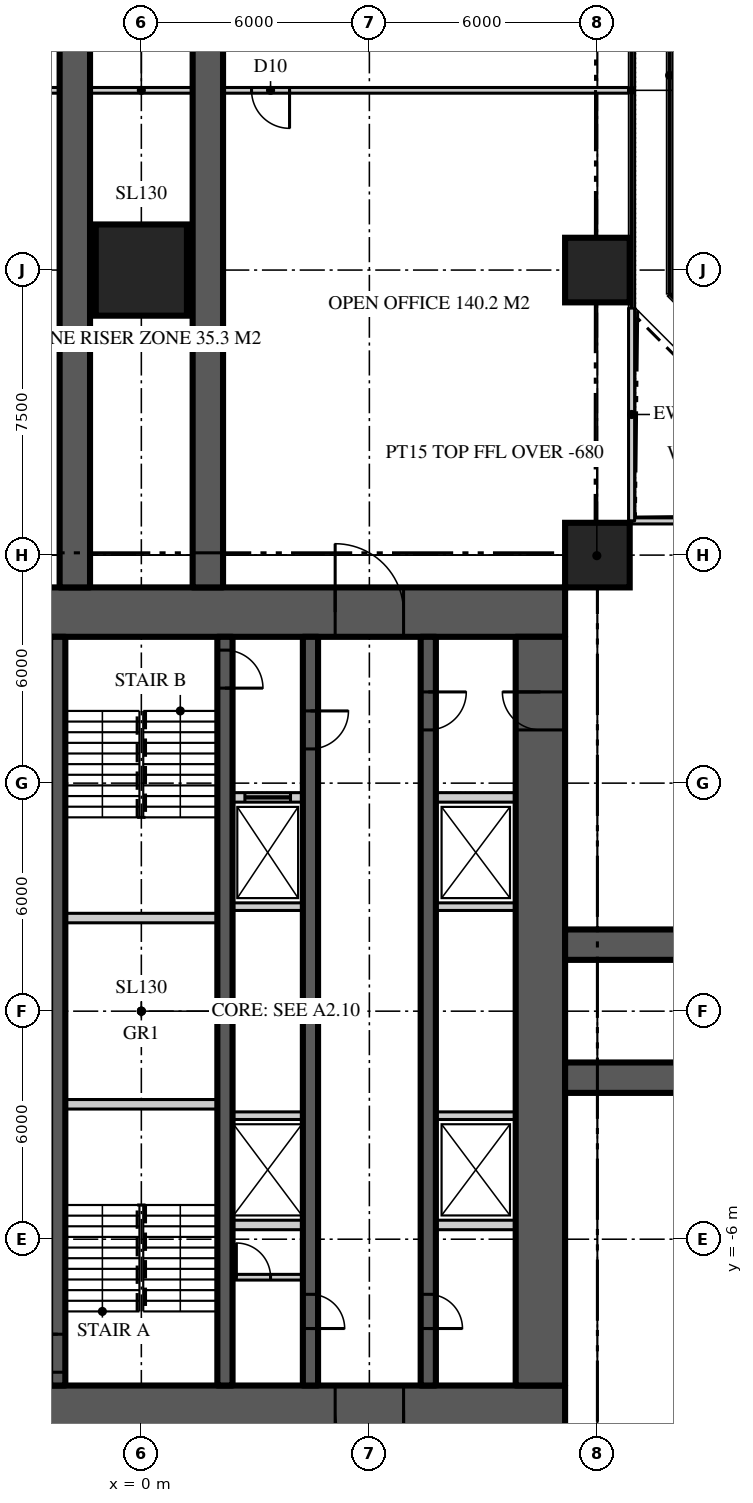
"""IFC4 building model, lengths in metres.
Left out: names, types, materials, properties, quantities, classifications, styles, units other than length and angle.
Written with IfcOpenShell. Run it as: python <this file> out.ifc"""

import sys

from ifc_helpers import new_model, si_unit, direction, frame, frame_2d, origin, origin_2d, place, context, subcontext, project, spatial, rectangle, extrude, element, fill, save


model = new_model("IFC4")
c1 = context("Model", 3, precision=1e-05, world=origin(), true_north=direction((0.0, 1.0)))
c2 = subcontext(c1, "Body", "Model", "MODEL_VIEW")
j1 = project(units=[si_unit("LENGTHUNIT", "METRE"), si_unit("PLANEANGLEUNIT", "RADIAN")], contexts=[c1])
p1 = place(None, origin())
s1 = spatial("IfcSite", under=j1, at=p1, CompositionType="ELEMENT")
p2 = place(p1, origin())
s2 = spatial("IfcBuilding", under=s1, at=p2, CompositionType="ELEMENT")
p3 = place(p2, frame((0.0, 0.0, 51.3)))
s3 = spatial("IfcBuildingStorey", under=s2, at=p3, CompositionType="ELEMENT", Elevation=51.3)
p4 = place(p3, frame((-11.15, 10.5, 0.0), z_axis=(0.0, 0.0, 1.0), x_axis=(1.0, 0.0, 0.0)))
e1 = element("IfcWall", 1, at=p4, inside=s3, PredefinedType="SHEAR", context=c2, shape_type="SweptSolid", body=[
    extrude(rectangle(XDim=22.3, YDim=1.3, at=frame_2d((11.15, 0.0))), origin(), (0.0, 0.0, 1.0), 3.9),
])
p5 = place(p4, frame((4.25, 0.0, 0.0)))
e2 = element("IfcOpeningElement", 2, at=p5, cuts=e1, PredefinedType="OPENING", context=c2, shape_type="SweptSolid", body=[
    extrude(rectangle(XDim=1.8, YDim=2.2, at=frame_2d((0.9, 1.1))), frame((0.0, 0.66, 0.0), z_axis=(0.0, -1.0, 0.0), x_axis=(1.0, 0.0, 0.0)), (0.0, 0.0, 1.0), 1.32),
])
p6 = place(p4, frame((16.25, 0.0, 0.0)))
e3 = element("IfcOpeningElement", 3, at=p6, cuts=e1, PredefinedType="OPENING", context=c2, shape_type="SweptSolid", body=[
    extrude(rectangle(XDim=1.8, YDim=2.2, at=frame_2d((0.9, 1.1))), frame((0.0, 0.66, 0.0), z_axis=(0.0, -1.0, 0.0), x_axis=(1.0, 0.0, 0.0)), (0.0, 0.0, 1.0), 1.32),
])
p7 = place(p3, frame((11.15, -10.5, 0.0), z_axis=(0.0, 0.0, 1.0), x_axis=(-1.0, 0.0, 0.0)))
e4 = element("IfcWall", 4, at=p7, inside=s3, PredefinedType="SHEAR", context=c2, shape_type="SweptSolid", body=[
    extrude(rectangle(XDim=22.3, YDim=1.3, at=frame_2d((11.15, 0.0))), origin(), (0.0, 0.0, 1.0), 3.9),
])
p8 = place(p7, frame((16.25, 0.0, 0.0)))
e5 = element("IfcOpeningElement", 5, at=p8, cuts=e4, PredefinedType="OPENING", context=c2, shape_type="SweptSolid", body=[
    extrude(rectangle(XDim=1.8, YDim=2.2, at=frame_2d((0.9, 1.1))), frame((0.0, 0.66, 0.0), z_axis=(0.0, -1.0, 0.0), x_axis=(1.0, 0.0, 0.0)), (0.0, 0.0, 1.0), 1.32),
])
p9 = place(p7, frame((4.25, 0.0, 0.0)))
e6 = element("IfcOpeningElement", 6, at=p9, cuts=e4, PredefinedType="OPENING", context=c2, shape_type="SweptSolid", body=[
    extrude(rectangle(XDim=1.8, YDim=2.2, at=frame_2d((0.9, 1.1))), frame((0.0, 0.66, 0.0), z_axis=(0.0, -1.0, 0.0), x_axis=(1.0, 0.0, 0.0)), (0.0, 0.0, 1.0), 1.32),
])
p10 = place(p3, frame((10.5, -9.85, 0.0), z_axis=(0.0, 0.0, 1.0), x_axis=(0.0, 1.0, 0.0)))
e7 = element("IfcWall", 7, at=p10, inside=s3, PredefinedType="SHEAR", context=c2, shape_type="SweptSolid", body=[
    extrude(rectangle(XDim=19.7, YDim=1.3, at=frame_2d((9.85, 0.0))), origin(), (0.0, 0.0, 1.0), 3.9),
])
p11 = place(p10, frame((17.25, 0.0, 0.0)))
e8 = element("IfcOpeningElement", 8, at=p11, cuts=e7, PredefinedType="OPENING", context=c2, shape_type="SweptSolid", body=[
    extrude(rectangle(XDim=1.0, YDim=2.2, at=frame_2d((0.5, 1.1))), frame((0.0, 0.66, 0.0), z_axis=(0.0, -1.0, 0.0), x_axis=(1.0, 0.0, 0.0)), (0.0, 0.0, 1.0), 1.32),
])
for number, where, z_axis, x_axis in (
    (9, (11.15, -1.75, 0.0), (0.0, 0.0, 1.0), (1.0, 0.0, 0.0)),
    (10, (11.15, 1.75, 0.0), (0.0, 0.0, 1.0), (1.0, 0.0, 0.0)),
    (11, (1.75, 11.15, 0.0), (0.0, 0.0, 1.0), (0.0, 1.0, 0.0)),
    (12, (-1.75, 11.15, 0.0), (0.0, 0.0, 1.0), (0.0, 1.0, 0.0)),
):
    element("IfcWall", number, at=place(p3, frame(where, z_axis=z_axis, x_axis=x_axis)), inside=s3, PredefinedType="SHEAR", context=c2, shape_type="SweptSolid", body=[
        extrude(rectangle(XDim=15.25, YDim=0.8, at=frame_2d((7.625, 0.0))), origin(), (0.0, 0.0, 1.0), 3.9),
    ])
p12 = place(p3, frame((12.0, 12.0, 0.0), z_axis=(0.0, 0.0, 1.0), x_axis=(1.0, 0.0, 0.0)))
e13 = element("IfcColumn", 13, at=p12, inside=s3, PredefinedType="COLUMN", context=c2, shape_type="SweptSolid", body=[
    extrude(rectangle(XDim=1.7, YDim=1.7, at=origin_2d()), origin(), (0.0, 0.0, 1.0), 3.9),
])
p13 = place(p3, frame((0.0, 19.5, 0.0), z_axis=(0.0, 0.0, 1.0), x_axis=(1.0, 0.0, 0.0)))
e14 = element("IfcColumn", 14, at=p13, inside=s3, PredefinedType="COLUMN", context=c2, shape_type="SweptSolid", body=[
    extrude(rectangle(XDim=2.4, YDim=2.4, at=origin_2d()), origin(), (0.0, 0.0, 1.0), 3.9),
])
p14 = place(p3, frame((12.0, 19.5, 0.0), z_axis=(0.0, 0.0, 1.0), x_axis=(1.0, 0.0, 0.0)))
e15 = element("IfcColumn", 15, at=p14, inside=s3, PredefinedType="COLUMN", context=c2, shape_type="SweptSolid", body=[
    extrude(rectangle(XDim=1.7, YDim=1.7, at=origin_2d()), origin(), (0.0, 0.0, 1.0), 3.9),
])
p15 = place(p3, frame((18.5, 12.9, 0.0), z_axis=(0.0, 0.0, 1.0), x_axis=(-1.0, 0.0, 0.0)))
e16 = element("IfcWall", 16, at=p15, inside=s3, PredefinedType="SOLIDWALL", context=c2, shape_type="SweptSolid", body=[
    extrude(rectangle(XDim=5.6, YDim=0.16, at=frame_2d((2.8, 0.0))), origin(), (0.0, 0.0, 1.0), 3.77),
])
p16 = place(p15, frame((2.3, 0.0, 0.0)))
e17 = element("IfcOpeningElement", 17, at=p16, cuts=e16, PredefinedType="OPENING", context=c2, shape_type="SweptSolid", body=[
    extrude(rectangle(XDim=1.0, YDim=2.2, at=frame_2d((0.5, 1.1))), frame((0.0, 0.09, 0.0), z_axis=(0.0, -1.0, 0.0), x_axis=(1.0, 0.0, 0.0)), (0.0, 0.0, 1.0), 0.18),
])
p17 = place(p3, frame((12.9, 12.9, 0.0), z_axis=(0.0, 0.0, 1.0), x_axis=(0.0, 1.0, 0.0)))
e18 = element("IfcWall", 18, at=p17, inside=s3, PredefinedType="SOLIDWALL", context=c2, shape_type="SweptSolid", body=[
    extrude(rectangle(XDim=5.6, YDim=0.16, at=frame_2d((2.8, 0.0))), origin(), (0.0, 0.0, 1.0), 3.77),
])
p18 = place(p3, frame((7.55, 9.85, 0.0), z_axis=(0.0, 0.0, 1.0), x_axis=(0.0, -1.0, 0.0)))
e19 = element("IfcWall", 19, at=p18, inside=s3, PredefinedType="SHEAR", context=c2, shape_type="SweptSolid", body=[
    extrude(rectangle(XDim=19.7, YDim=0.4, at=frame_2d((9.85, 0.0))), origin(), (0.0, 0.0, 1.0), 3.9),
])
p19 = place(p18, frame((1.45, 0.0, 0.0)))
e20 = element("IfcOpeningElement", 20, at=p19, cuts=e19, PredefinedType="OPENING", context=c2, shape_type="SweptSolid", body=[
    extrude(rectangle(XDim=1.0, YDim=2.2, at=frame_2d((0.5, 1.1))), frame((0.0, 0.21, 0.0), z_axis=(0.0, -1.0, 0.0), x_axis=(1.0, 0.0, 0.0)), (0.0, 0.0, 1.0), 0.42),
])
p20 = place(p18, frame((17.3, 0.0, 0.0)))
e21 = element("IfcOpeningElement", 21, at=p20, cuts=e19, PredefinedType="OPENING", context=c2, shape_type="SweptSolid", body=[
    extrude(rectangle(XDim=0.9, YDim=2.1, at=frame_2d((0.45, 1.05))), frame((0.0, 0.21, 0.0), z_axis=(0.0, -1.0, 0.0), x_axis=(1.0, 0.0, 0.0)), (0.0, 0.0, 1.0), 0.42),
])
p21 = place(p3, frame((4.45, 9.85, 0.0), z_axis=(0.0, 0.0, 1.0), x_axis=(0.0, -1.0, 0.0)))
e22 = element("IfcWall", 22, at=p21, inside=s3, PredefinedType="SHEAR", context=c2, shape_type="SweptSolid", body=[
    extrude(rectangle(XDim=19.7, YDim=0.4, at=frame_2d((9.85, 0.0))), origin(), (0.0, 0.0, 1.0), 3.9),
])
p22 = place(p21, frame((1.95, 0.0, 0.0)))
e23 = element("IfcOpeningElement", 23, at=p22, cuts=e22, PredefinedType="OPENING", context=c2, shape_type="SweptSolid", body=[
    extrude(rectangle(XDim=1.0, YDim=2.2, at=frame_2d((0.5, 1.1))), frame((0.0, 0.21, 0.0), z_axis=(0.0, -1.0, 0.0), x_axis=(1.0, 0.0, 0.0)), (0.0, 0.0, 1.0), 0.42),
])
p23 = place(p21, frame((17.3, 0.0, 0.0)))
e24 = element("IfcOpeningElement", 24, at=p23, cuts=e22, PredefinedType="OPENING", context=c2, shape_type="SweptSolid", body=[
    extrude(rectangle(XDim=0.9, YDim=2.1, at=frame_2d((0.45, 1.05))), frame((0.0, 0.21, 0.0), z_axis=(0.0, -1.0, 0.0), x_axis=(1.0, 0.0, 0.0)), (0.0, 0.0, 1.0), 0.42),
])
p24 = place(p3, frame((-2.2, -9.85, 0.0), z_axis=(0.0, 0.0, 1.0), x_axis=(0.0, 1.0, 0.0)))
e25 = element("IfcWall", 25, at=p24, inside=s3, PredefinedType="SHEAR", context=c2, shape_type="SweptSolid", body=[
    extrude(rectangle(XDim=19.7, YDim=0.4, at=frame_2d((9.85, 0.0))), origin(), (0.0, 0.0, 1.0), 3.9),
])
p25 = place(p24, frame((0.35, 0.0, 0.0)))
e26 = element("IfcOpeningElement", 26, at=p25, cuts=e25, PredefinedType="OPENING", context=c2, shape_type="SweptSolid", body=[
    extrude(rectangle(XDim=1.0, YDim=2.2, at=frame_2d((0.5, 1.1))), frame((0.0, 0.21, 0.0), z_axis=(0.0, -1.0, 0.0), x_axis=(1.0, 0.0, 0.0)), (0.0, 0.0, 1.0), 0.42),
])
p26 = place(p3, frame((2.2, 9.85, 0.0), z_axis=(0.0, 0.0, 1.0), x_axis=(0.0, -1.0, 0.0)))
e27 = element("IfcWall", 27, at=p26, inside=s3, PredefinedType="SHEAR", context=c2, shape_type="SweptSolid", body=[
    extrude(rectangle(XDim=19.7, YDim=0.4, at=frame_2d((9.85, 0.0))), origin(), (0.0, 0.0, 1.0), 3.9),
])
p27 = place(p26, frame((0.35, 0.0, 0.0)))
e28 = element("IfcOpeningElement", 28, at=p27, cuts=e27, PredefinedType="OPENING", context=c2, shape_type="SweptSolid", body=[
    extrude(rectangle(XDim=1.0, YDim=2.2, at=frame_2d((0.5, 1.1))), frame((0.0, 0.21, 0.0), z_axis=(0.0, -1.0, 0.0), x_axis=(1.0, 0.0, 0.0)), (0.0, 0.0, 1.0), 0.42),
])
p28 = place(p3, frame((2.4, 5.625, 0.0), z_axis=(0.0, 0.0, 1.0), x_axis=(1.0, 0.0, 0.0)))
e29 = element("IfcWall", 29, at=p28, inside=s3, PredefinedType="SOLIDWALL", context=c2, shape_type="SweptSolid", body=[
    extrude(rectangle(XDim=1.85, YDim=0.25, at=frame_2d((0.925, 0.0))), origin(), (0.0, 0.0, 1.0), 3.7),
])
p29 = place(p28, frame((0.325, 0.0, 0.0)))
e30 = element("IfcOpeningElement", 30, at=p29, cuts=e29, PredefinedType="OPENING", context=c2, shape_type="SweptSolid", body=[
    extrude(rectangle(XDim=1.2, YDim=2.2, at=frame_2d((0.6, 1.1))), frame((0.0, 0.135, 0.0), z_axis=(0.0, -1.0, 0.0), x_axis=(1.0, 0.0, 0.0)), (0.0, 0.0, 1.0), 0.27),
])
p30 = place(p3, frame((7.75, 5.625, 0.0), z_axis=(0.0, 0.0, 1.0), x_axis=(1.0, 0.0, 0.0)))
e31 = element("IfcWall", 31, at=p30, inside=s3, PredefinedType="SOLIDWALL", context=c2, shape_type="SweptSolid", body=[
    extrude(rectangle(XDim=2.1, YDim=0.25, at=frame_2d((1.05, 0.0))), origin(), (0.0, 0.0, 1.0), 3.7),
])
p31 = place(p3, frame((2.4, -5.625, 0.0), z_axis=(0.0, 0.0, 1.0), x_axis=(1.0, 0.0, 0.0)))
e32 = element("IfcWall", 32, at=p31, inside=s3, PredefinedType="SOLIDWALL", context=c2, shape_type="SweptSolid", body=[
    extrude(rectangle(XDim=1.85, YDim=0.25, at=frame_2d((0.925, 0.0))), origin(), (0.0, 0.0, 1.0), 3.7),
])
p32 = place(p3, frame((7.75, -5.625, 0.0), z_axis=(0.0, 0.0, 1.0), x_axis=(1.0, 0.0, 0.0)))
e33 = element("IfcWall", 33, at=p32, inside=s3, PredefinedType="SOLIDWALL", context=c2, shape_type="SweptSolid", body=[
    extrude(rectangle(XDim=2.1, YDim=0.25, at=frame_2d((1.05, 0.0))), origin(), (0.0, 0.0, 1.0), 3.7),
])
for number, where, z_axis, x_axis in (
    (34, (-2.0, -2.45, 0.0), (0.0, 0.0, 1.0), (1.0, 0.0, 0.0)),
    (35, (-2.0, 2.45, 0.0), (0.0, 0.0, 1.0), (1.0, 0.0, 0.0)),
):
    element("IfcWall", number, at=place(p3, frame(where, z_axis=z_axis, x_axis=x_axis)), inside=s3, PredefinedType="SOLIDWALL", context=c2, shape_type="SweptSolid", body=[
        extrude(rectangle(XDim=4.0, YDim=0.25, at=frame_2d((2.0, 0.0))), origin(), (0.0, 0.0, 1.0), 3.7),
    ])
p33 = place(p3, frame((2.4, -2.75, 0.0), z_axis=(0.0, 0.0, 1.0), x_axis=(1.0, 0.0, 0.0)))
e36 = element("IfcWall", 36, at=p33, inside=s3, PredefinedType="SOLIDWALL", context=c2, shape_type="SweptSolid", body=[
    extrude(rectangle(XDim=1.85, YDim=0.2, at=frame_2d((0.925, 0.0))), origin(), (0.0, 0.0, 1.0), 3.7),
])
p34 = place(p3, frame((7.75, -2.75, 0.0), z_axis=(0.0, 0.0, 1.0), x_axis=(1.0, 0.0, 0.0)))
e37 = element("IfcWall", 37, at=p34, inside=s3, PredefinedType="SOLIDWALL", context=c2, shape_type="SweptSolid", body=[
    extrude(rectangle(XDim=2.1, YDim=0.2, at=frame_2d((1.05, 0.0))), origin(), (0.0, 0.0, 1.0), 3.7),
])
p35 = place(p3, frame((2.4, 2.75, 0.0), z_axis=(0.0, 0.0, 1.0), x_axis=(1.0, 0.0, 0.0)))
e38 = element("IfcWall", 38, at=p35, inside=s3, PredefinedType="SOLIDWALL", context=c2, shape_type="SweptSolid", body=[
    extrude(rectangle(XDim=1.85, YDim=0.2, at=frame_2d((0.925, 0.0))), origin(), (0.0, 0.0, 1.0), 3.7),
])
p36 = place(p3, frame((7.75, 2.75, 0.0), z_axis=(0.0, 0.0, 1.0), x_axis=(1.0, 0.0, 0.0)))
e39 = element("IfcWall", 39, at=p36, inside=s3, PredefinedType="SOLIDWALL", context=c2, shape_type="SweptSolid", body=[
    extrude(rectangle(XDim=2.1, YDim=0.2, at=frame_2d((1.05, 0.0))), origin(), (0.0, 0.0, 1.0), 3.7),
])
p37 = place(p3, frame((12.82, 24.229, 0.0), z_axis=(0.0, 0.0, 1.0), x_axis=(-1.0, 0.0, 0.0)))
e40 = element("IfcWall", 40, at=p37, inside=s3, PredefinedType="PARTITIONING", context=c2, shape_type="SweptSolid", body=[
    extrude(rectangle(XDim=25.64, YDim=0.15, at=frame_2d((12.82, 0.0))), origin(), (0.0, 0.0, 1.0), 3.77),
])
p38 = place(p37, frame((15.72, 0.0, 0.0)))
e41 = element("IfcOpeningElement", 41, at=p38, cuts=e40, PredefinedType="OPENING", context=c2, shape_type="SweptSolid", body=[
    extrude(rectangle(XDim=1.0, YDim=2.2, at=frame_2d((0.5, 1.1))), frame((0.0, 0.085, 0.0), z_axis=(0.0, -1.0, 0.0), x_axis=(1.0, 0.0, 0.0)), (0.0, 0.0, 1.0), 0.17),
])
p39 = place(p37, frame((8.92, 0.0, 0.0)))
e42 = element("IfcOpeningElement", 42, at=p39, cuts=e40, PredefinedType="OPENING", context=c2, shape_type="SweptSolid", body=[
    extrude(rectangle(XDim=1.0, YDim=2.2, at=frame_2d((0.5, 1.1))), frame((0.0, 0.085, 0.0), z_axis=(0.0, -1.0, 0.0), x_axis=(1.0, 0.0, 0.0)), (0.0, 0.0, 1.0), 0.17),
])
p40 = place(p3, frame((11.15, 11.15, 0.0), z_axis=(0.0, 0.0, 1.0), x_axis=(0.707106781187, 0.707106781187, 0.0)))
e43 = element("IfcWall", 43, at=p40, inside=s3, PredefinedType="PARTITIONING", context=c2, shape_type="SweptSolid", body=[
    extrude(rectangle(XDim=2.362, YDim=0.15, at=frame_2d((1.181, 0.0))), origin(), (0.0, 0.0, 1.0), 3.22),
])
p41 = place(p3, frame((2.4, -7.0, 0.0), z_axis=(0.0, 0.0, 1.0), x_axis=(1.0, 0.0, 0.0)))
e44 = element("IfcWall", 44, at=p41, inside=s3, PredefinedType="SOLIDWALL", context=c2, shape_type="SweptSolid", body=[
    extrude(rectangle(XDim=1.85, YDim=0.15, at=frame_2d((0.925, 0.0))), origin(), (0.0, 0.0, 1.0), 3.77),
])
p42 = place(p41, frame((0.1, 0.0, 0.0)))
e45 = element("IfcOpeningElement", 45, at=p42, cuts=e44, PredefinedType="OPENING", context=c2, shape_type="SweptSolid", body=[
    extrude(rectangle(XDim=0.9, YDim=2.1, at=frame_2d((0.45, 1.05))), frame((0.0, 0.085, 0.0), z_axis=(0.0, -1.0, 0.0), x_axis=(1.0, 0.0, 0.0)), (0.0, 0.0, 1.0), 0.17),
])
p43 = place(p6, origin())
e46 = element("IfcDoor", 46, at=p43, inside=s3, OperationType="DOUBLE_DOOR_DOUBLE_SWING", PredefinedType="DOOR", context=c2, shape_type="SweptSolid", body=[
    extrude(rectangle(XDim=1.8, YDim=2.2, at=frame_2d((0.9, 1.1))), frame((0.0, 0.025, 0.0), z_axis=(0.0, -1.0, 0.0), x_axis=(1.0, 0.0, 0.0)), (0.0, 0.0, 1.0), 0.05),
])
fill(e3, e46)
p44 = place(p9, origin())
e47 = element("IfcDoor", 47, at=p44, inside=s3, OperationType="DOUBLE_DOOR_DOUBLE_SWING", PredefinedType="DOOR", context=c2, shape_type="SweptSolid", body=[
    extrude(rectangle(XDim=1.8, YDim=2.2, at=frame_2d((0.9, 1.1))), frame((0.0, 0.025, 0.0), z_axis=(0.0, -1.0, 0.0), x_axis=(1.0, 0.0, 0.0)), (0.0, 0.0, 1.0), 0.05),
])
fill(e6, e47)
p45 = place(p19, origin())
e48 = element("IfcDoor", 48, at=p45, inside=s3, OperationType="SINGLE_SWING_LEFT", PredefinedType="DOOR", context=c2, shape_type="SweptSolid", body=[
    extrude(rectangle(XDim=1.0, YDim=2.2, at=frame_2d((0.5, 1.1))), frame((0.0, 0.025, 0.0), z_axis=(0.0, -1.0, 0.0), x_axis=(1.0, 0.0, 0.0)), (0.0, 0.0, 1.0), 0.05),
])
fill(e20, e48)
p46 = place(p11, origin())
e49 = element("IfcDoor", 49, at=p46, inside=s3, OperationType="SINGLE_SWING_RIGHT", PredefinedType="DOOR", context=c2, shape_type="SweptSolid", body=[
    extrude(rectangle(XDim=1.0, YDim=2.2, at=frame_2d((0.5, 1.1))), frame((0.0, 0.025, 0.0), z_axis=(0.0, -1.0, 0.0), x_axis=(1.0, 0.0, 0.0)), (0.0, 0.0, 1.0), 0.05),
])
fill(e8, e49)
p47 = place(p25, origin())
e50 = element("IfcDoor", 50, at=p47, inside=s3, OperationType="SINGLE_SWING_RIGHT", PredefinedType="DOOR", context=c2, shape_type="SweptSolid", body=[
    extrude(rectangle(XDim=1.0, YDim=2.2, at=frame_2d((0.5, 1.1))), frame((0.0, 0.025, 0.0), z_axis=(0.0, -1.0, 0.0), x_axis=(1.0, 0.0, 0.0)), (0.0, 0.0, 1.0), 0.05),
])
fill(e26, e50)
p48 = place(p22, origin())
e51 = element("IfcDoor", 51, at=p48, inside=s3, OperationType="SINGLE_SWING_LEFT", PredefinedType="DOOR", context=c2, shape_type="SweptSolid", body=[
    extrude(rectangle(XDim=1.0, YDim=2.2, at=frame_2d((0.5, 1.1))), frame((0.0, 0.025, 0.0), z_axis=(0.0, -1.0, 0.0), x_axis=(1.0, 0.0, 0.0)), (0.0, 0.0, 1.0), 0.05),
])
fill(e23, e51)
p49 = place(p27, origin())
e52 = element("IfcDoor", 52, at=p49, inside=s3, OperationType="SINGLE_SWING_RIGHT", PredefinedType="DOOR", context=c2, shape_type="SweptSolid", body=[
    extrude(rectangle(XDim=1.0, YDim=2.2, at=frame_2d((0.5, 1.1))), frame((0.0, 0.025, 0.0), z_axis=(0.0, -1.0, 0.0), x_axis=(1.0, 0.0, 0.0)), (0.0, 0.0, 1.0), 0.05),
])
fill(e28, e52)
p50 = place(p20, origin())
e53 = element("IfcDoor", 53, at=p50, inside=s3, OperationType="SINGLE_SWING_RIGHT", PredefinedType="DOOR", context=c2, shape_type="SweptSolid", body=[
    extrude(rectangle(XDim=0.9, YDim=2.1, at=frame_2d((0.45, 1.05))), frame((0.0, 0.025, 0.0), z_axis=(0.0, -1.0, 0.0), x_axis=(1.0, 0.0, 0.0)), (0.0, 0.0, 1.0), 0.05),
])
fill(e21, e53)
p51 = place(p23, origin())
e54 = element("IfcDoor", 54, at=p51, inside=s3, OperationType="SINGLE_SWING_RIGHT", PredefinedType="DOOR", context=c2, shape_type="SweptSolid", body=[
    extrude(rectangle(XDim=0.9, YDim=2.1, at=frame_2d((0.45, 1.05))), frame((0.0, 0.025, 0.0), z_axis=(0.0, -1.0, 0.0), x_axis=(1.0, 0.0, 0.0)), (0.0, 0.0, 1.0), 0.05),
])
fill(e24, e54)
p52 = place(p29, origin())
e55 = element("IfcDoor", 55, at=p52, inside=s3, OperationType="SLIDING_TO_LEFT", PredefinedType="DOOR", context=c2, shape_type="SweptSolid", body=[
    extrude(rectangle(XDim=1.2, YDim=2.2, at=frame_2d((0.6, 1.1))), frame((0.0, 0.025, 0.0), z_axis=(0.0, -1.0, 0.0), x_axis=(1.0, 0.0, 0.0)), (0.0, 0.0, 1.0), 0.05),
])
fill(e30, e55)
p53 = place(p39, origin())
e56 = element("IfcDoor", 56, at=p53, inside=s3, OperationType="SINGLE_SWING_LEFT", PredefinedType="DOOR", context=c2, shape_type="SweptSolid", body=[
    extrude(rectangle(XDim=1.0, YDim=2.2, at=frame_2d((0.5, 1.1))), frame((0.0, 0.025, 0.0), z_axis=(0.0, -1.0, 0.0), x_axis=(1.0, 0.0, 0.0)), (0.0, 0.0, 1.0), 0.05),
])
fill(e42, e56)
p54 = place(p42, origin())
e57 = element("IfcDoor", 57, at=p54, inside=s3, OperationType="SINGLE_SWING_LEFT", PredefinedType="DOOR", context=c2, shape_type="SweptSolid", body=[
    extrude(rectangle(XDim=0.9, YDim=2.1, at=frame_2d((0.45, 1.05))), frame((0.0, 0.025, 0.0), z_axis=(0.0, -1.0, 0.0), x_axis=(1.0, 0.0, 0.0)), (0.0, 0.0, 1.0), 0.05),
])
fill(e45, e57)
save(model, sys.argv[1])
